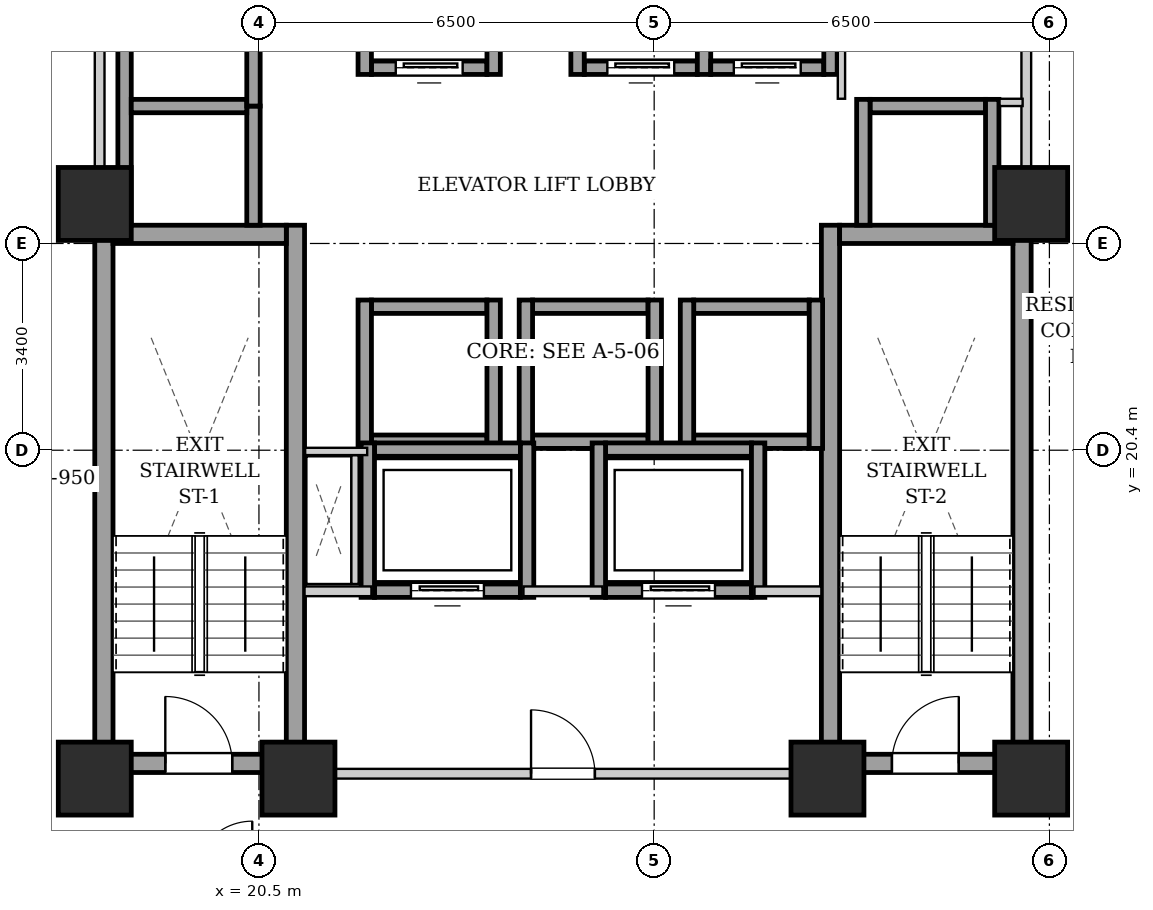
"""IFC4 building model, lengths in metres.
Left out: names, types, materials, properties, quantities, classifications, styles, units other than length and angle.
Written with IfcOpenShell. Run it as: python <this file> out.ifc"""

import sys

from ifc_helpers import new_model, si_unit, direction, frame, frame_2d, origin, origin_2d, place, context, subcontext, project, spatial, rectangle, extrude, element, fill, save


model = new_model("IFC4")
c1 = context("Model", 3, precision=1e-05, world=origin(), true_north=direction((0.0, 1.0)))
c2 = subcontext(c1, "Body", "Model", "MODEL_VIEW")
j1 = project(units=[si_unit("LENGTHUNIT", "METRE"), si_unit("PLANEANGLEUNIT", "RADIAN")], contexts=[c1])
p1 = place(None, origin())
s1 = spatial("IfcSite", under=j1, at=p1, CompositionType="ELEMENT")
p2 = place(p1, origin())
s2 = spatial("IfcBuilding", under=s1, at=p2, CompositionType="ELEMENT")
p3 = place(p2, frame((0.0, 0.0, 48.2)))
s3 = spatial("IfcBuildingStorey", under=s2, at=p3, CompositionType="ELEMENT", Elevation=48.2)
for number, where, z_axis, x_axis in (
    (1, (17.8, 15.0, 0.0), (0.0, 0.0, 1.0), (1.0, 0.0, 0.0)),
    (2, (21.15, 15.0, 0.0), (0.0, 0.0, 1.0), (1.0, 0.0, 0.0)),
    (3, (29.85, 15.0, 0.0), (0.0, 0.0, 1.0), (1.0, 0.0, 0.0)),
    (4, (33.2, 15.0, 0.0), (0.0, 0.0, 1.0), (1.0, 0.0, 0.0)),
    (5, (17.8, 24.45, 0.0), (0.0, 0.0, 1.0), (1.0, 0.0, 0.0)),
    (6, (33.2, 24.45, 0.0), (0.0, 0.0, 1.0), (1.0, 0.0, 0.0)),
):
    element("IfcColumn", number, at=place(p3, frame(where, z_axis=z_axis, x_axis=x_axis)), inside=s3, PredefinedType="COLUMN", context=c2, shape_type="SweptSolid", body=[
        extrude(rectangle(XDim=1.2, YDim=1.2, at=origin_2d()), origin(), (0.0, 0.0, 1.0), 3.2),
    ])
for number, where, z_axis, x_axis in (
    (7, (17.95, 15.1, 0.0), (0.0, 0.0, 1.0), (0.0, 1.0, 0.0)),
    (8, (21.1, 15.1, 0.0), (0.0, 0.0, 1.0), (0.0, 1.0, 0.0)),
):
    element("IfcWall", number, at=place(p3, frame(where, z_axis=z_axis, x_axis=x_axis)), inside=s3, PredefinedType="SHEAR", context=c2, shape_type="SweptSolid", body=[
        extrude(rectangle(XDim=9.0, YDim=0.3, at=frame_2d((4.5, 0.0))), origin(), (0.0, 0.0, 1.0), 2.94),
    ])
p4 = place(p3, frame((18.1, 23.95, 0.0), z_axis=(0.0, 0.0, 1.0), x_axis=(1.0, 0.0, 0.0)))
e9 = element("IfcWall", 9, at=p4, inside=s3, PredefinedType="SHEAR", context=c2, shape_type="SweptSolid", body=[
    extrude(rectangle(XDim=2.85, YDim=0.3, at=frame_2d((1.425, 0.0))), origin(), (0.0, 0.0, 1.0), 2.94),
])
p5 = place(p3, frame((18.1, 15.25, 0.0), z_axis=(0.0, 0.0, 1.0), x_axis=(1.0, 0.0, 0.0)))
e10 = element("IfcWall", 10, at=p5, inside=s3, PredefinedType="SHEAR", context=c2, shape_type="SweptSolid", body=[
    extrude(rectangle(XDim=2.85, YDim=0.3, at=frame_2d((1.425, 0.0))), origin(), (0.0, 0.0, 1.0), 2.94),
])
p6 = place(p5, frame((0.86, 0.0, 0.0)))
e11 = element("IfcOpeningElement", 11, at=p6, cuts=e10, PredefinedType="OPENING", context=c2, shape_type="SweptSolid", body=[
    extrude(rectangle(XDim=1.1, YDim=2.05, at=frame_2d((0.55, 1.025))), frame((0.0, 0.16, 0.0), z_axis=(0.0, -1.0, 0.0), x_axis=(1.0, 0.0, 0.0)), (0.0, 0.0, 1.0), 0.32),
])
for number, where, z_axis, x_axis in (
    (12, (29.9, 15.1, 0.0), (0.0, 0.0, 1.0), (0.0, 1.0, 0.0)),
    (13, (33.05, 15.1, 0.0), (0.0, 0.0, 1.0), (0.0, 1.0, 0.0)),
):
    element("IfcWall", number, at=place(p3, frame(where, z_axis=z_axis, x_axis=x_axis)), inside=s3, PredefinedType="SHEAR", context=c2, shape_type="SweptSolid", body=[
        extrude(rectangle(XDim=9.0, YDim=0.3, at=frame_2d((4.5, 0.0))), origin(), (0.0, 0.0, 1.0), 2.94),
    ])
p7 = place(p3, frame((30.05, 23.95, 0.0), z_axis=(0.0, 0.0, 1.0), x_axis=(1.0, 0.0, 0.0)))
e14 = element("IfcWall", 14, at=p7, inside=s3, PredefinedType="SHEAR", context=c2, shape_type="SweptSolid", body=[
    extrude(rectangle(XDim=2.85, YDim=0.3, at=frame_2d((1.425, 0.0))), origin(), (0.0, 0.0, 1.0), 2.94),
])
p8 = place(p3, frame((30.05, 15.25, 0.0), z_axis=(0.0, 0.0, 1.0), x_axis=(1.0, 0.0, 0.0)))
e15 = element("IfcWall", 15, at=p8, inside=s3, PredefinedType="SHEAR", context=c2, shape_type="SweptSolid", body=[
    extrude(rectangle(XDim=2.85, YDim=0.3, at=frame_2d((1.425, 0.0))), origin(), (0.0, 0.0, 1.0), 2.94),
])
p9 = place(p8, frame((0.86, 0.0, 0.0)))
e16 = element("IfcOpeningElement", 16, at=p9, cuts=e15, PredefinedType="OPENING", context=c2, shape_type="SweptSolid", body=[
    extrude(rectangle(XDim=1.1, YDim=2.05, at=frame_2d((0.55, 1.025))), frame((0.0, 0.16, 0.0), z_axis=(0.0, -1.0, 0.0), x_axis=(1.0, 0.0, 0.0)), (0.0, 0.0, 1.0), 0.32),
])
p10 = place(p3, frame((22.35, 26.69, 0.0), z_axis=(0.0, 0.0, 1.0), x_axis=(1.0, 0.0, 0.0)))
e17 = element("IfcWall", 17, at=p10, inside=s3, PredefinedType="SHEAR", context=c2, shape_type="SweptSolid", body=[
    extrude(rectangle(XDim=1.9, YDim=0.22, at=frame_2d((0.95, 0.0))), origin(), (0.0, 0.0, 1.0), 2.94),
])
p11 = place(p10, frame((0.4, 0.0, 0.0)))
e18 = element("IfcOpeningElement", 18, at=p11, cuts=e17, PredefinedType="OPENING", context=c2, shape_type="SweptSolid", body=[
    extrude(rectangle(XDim=1.1, YDim=2.15, at=frame_2d((0.55, 1.075))), frame((0.0, 0.12, 0.0), z_axis=(0.0, -1.0, 0.0), x_axis=(1.0, 0.0, 0.0)), (0.0, 0.0, 1.0), 0.24),
])
for number, where, z_axis, x_axis in (
    (19, (22.24, 26.58, 0.0), (0.0, 0.0, 1.0), (0.0, 1.0, 0.0)),
    (20, (24.36, 26.58, 0.0), (0.0, 0.0, 1.0), (0.0, 1.0, 0.0)),
):
    element("IfcWall", number, at=place(p3, frame(where, z_axis=z_axis, x_axis=x_axis)), inside=s3, PredefinedType="SHEAR", context=c2, shape_type="SweptSolid", body=[
        extrude(rectangle(XDim=2.44, YDim=0.22, at=frame_2d((1.22, 0.0))), origin(), (0.0, 0.0, 1.0), 2.94),
    ])
p12 = place(p3, frame((25.85, 26.69, 0.0), z_axis=(0.0, 0.0, 1.0), x_axis=(1.0, 0.0, 0.0)))
e21 = element("IfcWall", 21, at=p12, inside=s3, PredefinedType="SHEAR", context=c2, shape_type="SweptSolid", body=[
    extrude(rectangle(XDim=1.86, YDim=0.22, at=frame_2d((0.93, 0.0))), origin(), (0.0, 0.0, 1.0), 2.94),
])
p13 = place(p12, frame((0.38, 0.0, 0.0)))
e22 = element("IfcOpeningElement", 22, at=p13, cuts=e21, PredefinedType="OPENING", context=c2, shape_type="SweptSolid", body=[
    extrude(rectangle(XDim=1.1, YDim=2.15, at=frame_2d((0.55, 1.075))), frame((0.0, 0.12, 0.0), z_axis=(0.0, -1.0, 0.0), x_axis=(1.0, 0.0, 0.0)), (0.0, 0.0, 1.0), 0.24),
])
for number, where, z_axis, x_axis in (
    (23, (25.74, 26.58, 0.0), (0.0, 0.0, 1.0), (0.0, 1.0, 0.0)),
    (24, (27.82, 26.58, 0.0), (0.0, 0.0, 1.0), (0.0, 1.0, 0.0)),
):
    element("IfcWall", number, at=place(p3, frame(where, z_axis=z_axis, x_axis=x_axis)), inside=s3, PredefinedType="SHEAR", context=c2, shape_type="SweptSolid", body=[
        extrude(rectangle(XDim=2.44, YDim=0.22, at=frame_2d((1.22, 0.0))), origin(), (0.0, 0.0, 1.0), 2.94),
    ])
p14 = place(p3, frame((27.93, 26.69, 0.0), z_axis=(0.0, 0.0, 1.0), x_axis=(1.0, 0.0, 0.0)))
e25 = element("IfcWall", 25, at=p14, inside=s3, PredefinedType="SHEAR", context=c2, shape_type="SweptSolid", body=[
    extrude(rectangle(XDim=1.86, YDim=0.22, at=frame_2d((0.93, 0.0))), origin(), (0.0, 0.0, 1.0), 2.94),
])
p15 = place(p14, frame((0.38, 0.0, 0.0)))
e26 = element("IfcOpeningElement", 26, at=p15, cuts=e25, PredefinedType="OPENING", context=c2, shape_type="SweptSolid", body=[
    extrude(rectangle(XDim=1.1, YDim=2.15, at=frame_2d((0.55, 1.075))), frame((0.0, 0.12, 0.0), z_axis=(0.0, -1.0, 0.0), x_axis=(1.0, 0.0, 0.0)), (0.0, 0.0, 1.0), 0.24),
])
p16 = place(p3, frame((29.9, 26.58, 0.0), z_axis=(0.0, 0.0, 1.0), x_axis=(0.0, 1.0, 0.0)))
e27 = element("IfcWall", 27, at=p16, inside=s3, PredefinedType="SHEAR", context=c2, shape_type="SweptSolid", body=[
    extrude(rectangle(XDim=2.44, YDim=0.22, at=frame_2d((1.22, 0.0))), origin(), (0.0, 0.0, 1.0), 2.94),
])
for number, where, z_axis, x_axis in (
    (28, (22.35, 20.54, 0.0), (0.0, 0.0, 1.0), (1.0, 0.0, 0.0)),
    (29, (22.35, 22.76, 0.0), (0.0, 0.0, 1.0), (1.0, 0.0, 0.0)),
):
    element("IfcWall", number, at=place(p3, frame(where, z_axis=z_axis, x_axis=x_axis)), inside=s3, PredefinedType="SHEAR", context=c2, shape_type="SweptSolid", body=[
        extrude(rectangle(XDim=1.9, YDim=0.22, at=frame_2d((0.95, 0.0))), origin(), (0.0, 0.0, 1.0), 2.94),
    ])
for number, where, z_axis, x_axis in (
    (30, (22.24, 20.43, 0.0), (0.0, 0.0, 1.0), (0.0, 1.0, 0.0)),
    (31, (24.36, 20.43, 0.0), (0.0, 0.0, 1.0), (0.0, 1.0, 0.0)),
):
    element("IfcWall", number, at=place(p3, frame(where, z_axis=z_axis, x_axis=x_axis)), inside=s3, PredefinedType="SHEAR", context=c2, shape_type="SweptSolid", body=[
        extrude(rectangle(XDim=2.44, YDim=0.22, at=frame_2d((1.22, 0.0))), origin(), (0.0, 0.0, 1.0), 2.94),
    ])
for number, where, z_axis, x_axis in (
    (32, (25.0, 20.54, 0.0), (0.0, 0.0, 1.0), (1.0, 0.0, 0.0)),
    (33, (25.0, 22.76, 0.0), (0.0, 0.0, 1.0), (1.0, 0.0, 0.0)),
):
    element("IfcWall", number, at=place(p3, frame(where, z_axis=z_axis, x_axis=x_axis)), inside=s3, PredefinedType="SHEAR", context=c2, shape_type="SweptSolid", body=[
        extrude(rectangle(XDim=1.9, YDim=0.22, at=frame_2d((0.95, 0.0))), origin(), (0.0, 0.0, 1.0), 2.94),
    ])
for number, where, z_axis, x_axis in (
    (34, (24.89, 20.43, 0.0), (0.0, 0.0, 1.0), (0.0, 1.0, 0.0)),
    (35, (27.01, 20.43, 0.0), (0.0, 0.0, 1.0), (0.0, 1.0, 0.0)),
):
    element("IfcWall", number, at=place(p3, frame(where, z_axis=z_axis, x_axis=x_axis)), inside=s3, PredefinedType="SHEAR", context=c2, shape_type="SweptSolid", body=[
        extrude(rectangle(XDim=2.44, YDim=0.22, at=frame_2d((1.22, 0.0))), origin(), (0.0, 0.0, 1.0), 2.94),
    ])
for number, where, z_axis, x_axis in (
    (36, (27.65, 20.54, 0.0), (0.0, 0.0, 1.0), (1.0, 0.0, 0.0)),
    (37, (27.65, 22.76, 0.0), (0.0, 0.0, 1.0), (1.0, 0.0, 0.0)),
):
    element("IfcWall", number, at=place(p3, frame(where, z_axis=z_axis, x_axis=x_axis)), inside=s3, PredefinedType="SHEAR", context=c2, shape_type="SweptSolid", body=[
        extrude(rectangle(XDim=1.9, YDim=0.22, at=frame_2d((0.95, 0.0))), origin(), (0.0, 0.0, 1.0), 2.94),
    ])
for number, where, z_axis, x_axis in (
    (38, (27.54, 20.43, 0.0), (0.0, 0.0, 1.0), (0.0, 1.0, 0.0)),
    (39, (29.66, 20.43, 0.0), (0.0, 0.0, 1.0), (0.0, 1.0, 0.0)),
):
    element("IfcWall", number, at=place(p3, frame(where, z_axis=z_axis, x_axis=x_axis)), inside=s3, PredefinedType="SHEAR", context=c2, shape_type="SweptSolid", body=[
        extrude(rectangle(XDim=2.44, YDim=0.22, at=frame_2d((1.22, 0.0))), origin(), (0.0, 0.0, 1.0), 2.94),
    ])
p17 = place(p3, frame((18.29, 24.1, 0.0), z_axis=(0.0, 0.0, 1.0), x_axis=(0.0, 1.0, 0.0)))
e40 = element("IfcWall", 40, at=p17, inside=s3, PredefinedType="SHEAR", context=c2, shape_type="SweptSolid", body=[
    extrude(rectangle(XDim=4.14, YDim=0.22, at=frame_2d((2.07, 0.0))), origin(), (0.0, 0.0, 1.0), 2.94),
])
p18 = place(p3, frame((20.41, 24.1, 0.0), z_axis=(0.0, 0.0, 1.0), x_axis=(0.0, 1.0, 0.0)))
e41 = element("IfcWall", 41, at=p18, inside=s3, PredefinedType="SHEAR", context=c2, shape_type="SweptSolid", body=[
    extrude(rectangle(XDim=1.96, YDim=0.22, at=frame_2d((0.98, 0.0))), origin(), (0.0, 0.0, 1.0), 2.94),
])
p19 = place(p3, frame((18.4, 26.06, 0.0), z_axis=(0.0, 0.0, 1.0), x_axis=(1.0, 0.0, 0.0)))
e42 = element("IfcWall", 42, at=p19, inside=s3, PredefinedType="SHEAR", context=c2, shape_type="SweptSolid", body=[
    extrude(rectangle(XDim=1.9, YDim=0.22, at=frame_2d((0.95, 0.0))), origin(), (0.0, 0.0, 1.0), 2.94),
])
p20 = place(p3, frame((20.41, 26.06, 0.0), z_axis=(0.0, 0.0, 1.0), x_axis=(0.0, 1.0, 0.0)))
e43 = element("IfcWall", 43, at=p20, inside=s3, PredefinedType="SHEAR", context=c2, shape_type="SweptSolid", body=[
    extrude(rectangle(XDim=2.18, YDim=0.22, at=frame_2d((1.09, 0.0))), origin(), (0.0, 0.0, 1.0), 2.94),
])
p21 = place(p3, frame((30.55, 26.06, 0.0), z_axis=(0.0, 0.0, 1.0), x_axis=(1.0, 0.0, 0.0)))
e44 = element("IfcWall", 44, at=p21, inside=s3, PredefinedType="SHEAR", context=c2, shape_type="SweptSolid", body=[
    extrude(rectangle(XDim=1.9, YDim=0.22, at=frame_2d((0.95, 0.0))), origin(), (0.0, 0.0, 1.0), 2.94),
])
for number, where, z_axis, x_axis in (
    (45, (30.44, 24.1, 0.0), (0.0, 0.0, 1.0), (0.0, 1.0, 0.0)),
    (46, (32.56, 24.1, 0.0), (0.0, 0.0, 1.0), (0.0, 1.0, 0.0)),
):
    element("IfcWall", number, at=place(p3, frame(where, z_axis=z_axis, x_axis=x_axis)), inside=s3, PredefinedType="SHEAR", context=c2, shape_type="SweptSolid", body=[
        extrude(rectangle(XDim=2.07, YDim=0.22, at=frame_2d((1.035, 0.0))), origin(), (0.0, 0.0, 1.0), 2.94),
    ])
p22 = place(p3, frame((22.4, 18.09, 0.0), z_axis=(0.0, 0.0, 1.0), x_axis=(1.0, 0.0, 0.0)))
e47 = element("IfcWall", 47, at=p22, inside=s3, PredefinedType="SHEAR", context=c2, shape_type="SweptSolid", body=[
    extrude(rectangle(XDim=2.4, YDim=0.22, at=frame_2d((1.2, 0.0))), origin(), (0.0, 0.0, 1.0), 2.94),
])
p23 = place(p22, frame((0.6, 0.0, 0.0)))
e48 = element("IfcOpeningElement", 48, at=p23, cuts=e47, PredefinedType="OPENING", context=c2, shape_type="SweptSolid", body=[
    extrude(rectangle(XDim=1.2, YDim=2.15, at=frame_2d((0.6, 1.075))), frame((0.0, 0.12, 0.0), z_axis=(0.0, -1.0, 0.0), x_axis=(1.0, 0.0, 0.0)), (0.0, 0.0, 1.0), 0.24),
])
p24 = place(p3, frame((22.4, 20.41, 0.0), z_axis=(0.0, 0.0, 1.0), x_axis=(1.0, 0.0, 0.0)))
e49 = element("IfcWall", 49, at=p24, inside=s3, PredefinedType="SHEAR", context=c2, shape_type="SweptSolid", body=[
    extrude(rectangle(XDim=2.4, YDim=0.22, at=frame_2d((1.2, 0.0))), origin(), (0.0, 0.0, 1.0), 2.94),
])
for number, where, z_axis, x_axis in (
    (50, (22.29, 17.98, 0.0), (0.0, 0.0, 1.0), (0.0, 1.0, 0.0)),
    (51, (24.91, 17.98, 0.0), (0.0, 0.0, 1.0), (0.0, 1.0, 0.0)),
):
    element("IfcWall", number, at=place(p3, frame(where, z_axis=z_axis, x_axis=x_axis)), inside=s3, PredefinedType="SHEAR", context=c2, shape_type="SweptSolid", body=[
        extrude(rectangle(XDim=2.54, YDim=0.22, at=frame_2d((1.27, 0.0))), origin(), (0.0, 0.0, 1.0), 2.94),
    ])
p25 = place(p3, frame((26.2, 18.09, 0.0), z_axis=(0.0, 0.0, 1.0), x_axis=(1.0, 0.0, 0.0)))
e52 = element("IfcWall", 52, at=p25, inside=s3, PredefinedType="SHEAR", context=c2, shape_type="SweptSolid", body=[
    extrude(rectangle(XDim=2.4, YDim=0.22, at=frame_2d((1.2, 0.0))), origin(), (0.0, 0.0, 1.0), 2.94),
])
p26 = place(p25, frame((0.6, 0.0, 0.0)))
e53 = element("IfcOpeningElement", 53, at=p26, cuts=e52, PredefinedType="OPENING", context=c2, shape_type="SweptSolid", body=[
    extrude(rectangle(XDim=1.2, YDim=2.15, at=frame_2d((0.6, 1.075))), frame((0.0, 0.12, 0.0), z_axis=(0.0, -1.0, 0.0), x_axis=(1.0, 0.0, 0.0)), (0.0, 0.0, 1.0), 0.24),
])
p27 = place(p3, frame((26.2, 20.41, 0.0), z_axis=(0.0, 0.0, 1.0), x_axis=(1.0, 0.0, 0.0)))
e54 = element("IfcWall", 54, at=p27, inside=s3, PredefinedType="SHEAR", context=c2, shape_type="SweptSolid", body=[
    extrude(rectangle(XDim=2.4, YDim=0.22, at=frame_2d((1.2, 0.0))), origin(), (0.0, 0.0, 1.0), 2.94),
])
for number, where, z_axis, x_axis in (
    (55, (26.09, 17.98, 0.0), (0.0, 0.0, 1.0), (0.0, 1.0, 0.0)),
    (56, (28.71, 17.98, 0.0), (0.0, 0.0, 1.0), (0.0, 1.0, 0.0)),
):
    element("IfcWall", number, at=place(p3, frame(where, z_axis=z_axis, x_axis=x_axis)), inside=s3, PredefinedType="SHEAR", context=c2, shape_type="SweptSolid", body=[
        extrude(rectangle(XDim=2.54, YDim=0.22, at=frame_2d((1.27, 0.0))), origin(), (0.0, 0.0, 1.0), 2.94),
    ])
p28 = place(p3, frame((21.25, 15.08, 0.0), z_axis=(0.0, 0.0, 1.0), x_axis=(1.0, 0.0, 0.0)))
e57 = element("IfcWall", 57, at=p28, inside=s3, PredefinedType="PARTITIONING", context=c2, shape_type="SweptSolid", body=[
    extrude(rectangle(XDim=8.5, YDim=0.16, at=frame_2d((4.25, 0.0))), origin(), (0.0, 0.0, 1.0), 2.232),
])
p29 = place(p28, frame((3.725, 0.0, 0.0)))
e58 = element("IfcOpeningElement", 58, at=p29, cuts=e57, PredefinedType="OPENING", context=c2, shape_type="SweptSolid", body=[
    extrude(rectangle(XDim=1.05, YDim=2.05, at=frame_2d((0.525, 1.025))), frame((0.0, 0.09, 0.0), z_axis=(0.0, -1.0, 0.0), x_axis=(1.0, 0.0, 0.0)), (0.0, 0.0, 1.0), 0.18),
])
p30 = place(p3, frame((21.25, 18.08, 0.0), z_axis=(0.0, 0.0, 1.0), x_axis=(1.0, 0.0, 0.0)))
e59 = element("IfcWall", 59, at=p30, inside=s3, PredefinedType="PARTITIONING", context=c2, shape_type="SweptSolid", body=[
    extrude(rectangle(XDim=1.1, YDim=0.16, at=frame_2d((0.55, 0.0))), origin(), (0.0, 0.0, 1.0), 2.94),
])
p31 = place(p3, frame((24.85, 18.08, 0.0), z_axis=(0.0, 0.0, 1.0), x_axis=(1.0, 0.0, 0.0)))
e60 = element("IfcWall", 60, at=p31, inside=s3, PredefinedType="PARTITIONING", context=c2, shape_type="SweptSolid", body=[
    extrude(rectangle(XDim=1.3, YDim=0.16, at=frame_2d((0.65, 0.0))), origin(), (0.0, 0.0, 1.0), 2.94),
])
p32 = place(p3, frame((28.65, 18.08, 0.0), z_axis=(0.0, 0.0, 1.0), x_axis=(1.0, 0.0, 0.0)))
e61 = element("IfcWall", 61, at=p32, inside=s3, PredefinedType="PARTITIONING", context=c2, shape_type="SweptSolid", body=[
    extrude(rectangle(XDim=1.1, YDim=0.16, at=frame_2d((0.55, 0.0))), origin(), (0.0, 0.0, 1.0), 2.94),
])
for number, where, z_axis, x_axis in (
    (62, (17.88, 24.12, 0.0), (0.0, 0.0, 1.0), (0.0, 1.0, 0.0)),
    (63, (33.12, 24.12, 0.0), (0.0, 0.0, 1.0), (0.0, 1.0, 0.0)),
):
    element("IfcWall", number, at=place(p3, frame(where, z_axis=z_axis, x_axis=x_axis)), inside=s3, PredefinedType="PARTITIONING", context=c2, shape_type="SweptSolid", body=[
        extrude(rectangle(XDim=4.76, YDim=0.16, at=frame_2d((2.38, 0.0))), origin(), (0.0, 0.0, 1.0), 2.275),
    ])
p33 = place(p3, frame((22.08, 18.2, 0.0), z_axis=(0.0, 0.0, 1.0), x_axis=(0.0, 1.0, 0.0)))
e64 = element("IfcWall", 64, at=p33, inside=s3, PredefinedType="PARTITIONING", context=c2, shape_type="SweptSolid", body=[
    extrude(rectangle(XDim=2.12, YDim=0.12, at=frame_2d((1.06, 0.0))), origin(), (0.0, 0.0, 1.0), 2.94),
])
p34 = place(p3, frame((22.28, 20.38, 0.0), z_axis=(0.0, 0.0, 1.0), x_axis=(-1.0, 0.0, 0.0)))
e65 = element("IfcWall", 65, at=p34, inside=s3, PredefinedType="PARTITIONING", context=c2, shape_type="SweptSolid", body=[
    extrude(rectangle(XDim=1.02, YDim=0.12, at=frame_2d((0.51, 0.0))), origin(), (0.0, 0.0, 1.0), 2.94),
])
p35 = place(p3, frame((30.08, 26.18, 0.0), z_axis=(0.0, 0.0, 1.0), x_axis=(0.0, 1.0, 0.0)))
e66 = element("IfcWall", 66, at=p35, inside=s3, PredefinedType="PARTITIONING", context=c2, shape_type="SweptSolid", body=[
    extrude(rectangle(XDim=2.68, YDim=0.12, at=frame_2d((1.34, 0.0))), origin(), (0.0, 0.0, 1.0), 2.94),
])
p36 = place(p3, frame((32.68, 26.12, 0.0), z_axis=(0.0, 0.0, 1.0), x_axis=(1.0, 0.0, 0.0)))
e67 = element("IfcWall", 67, at=p36, inside=s3, PredefinedType="PARTITIONING", context=c2, shape_type="SweptSolid", body=[
    extrude(rectangle(XDim=0.38, YDim=0.12, at=frame_2d((0.19, 0.0))), origin(), (0.0, 0.0, 1.0), 2.94),
])
p37 = place(p6, origin())
e68 = element("IfcDoor", 68, at=p37, inside=s3, OperationType="SINGLE_SWING_LEFT", PredefinedType="DOOR", context=c2, shape_type="SweptSolid", body=[
    extrude(rectangle(XDim=1.1, YDim=2.05, at=frame_2d((0.55, 1.025))), frame((0.0, 0.025, 0.0), z_axis=(0.0, -1.0, 0.0), x_axis=(1.0, 0.0, 0.0)), (0.0, 0.0, 1.0), 0.05),
])
fill(e11, e68)
p38 = place(p9, origin())
e69 = element("IfcDoor", 69, at=p38, inside=s3, OperationType="SINGLE_SWING_RIGHT", PredefinedType="DOOR", context=c2, shape_type="SweptSolid", body=[
    extrude(rectangle(XDim=1.1, YDim=2.05, at=frame_2d((0.55, 1.025))), frame((0.0, 0.025, 0.0), z_axis=(0.0, -1.0, 0.0), x_axis=(1.0, 0.0, 0.0)), (0.0, 0.0, 1.0), 0.05),
])
fill(e16, e69)
p39 = place(p11, origin())
e70 = element("IfcDoor", 70, at=p39, inside=s3, OperationType="SLIDING_TO_LEFT", PredefinedType="DOOR", context=c2, shape_type="SweptSolid", body=[
    extrude(rectangle(XDim=1.1, YDim=2.15, at=frame_2d((0.55, 1.075))), frame((0.0, 0.025, 0.0), z_axis=(0.0, -1.0, 0.0), x_axis=(1.0, 0.0, 0.0)), (0.0, 0.0, 1.0), 0.05),
])
fill(e18, e70)
p40 = place(p13, origin())
e71 = element("IfcDoor", 71, at=p40, inside=s3, OperationType="SLIDING_TO_LEFT", PredefinedType="DOOR", context=c2, shape_type="SweptSolid", body=[
    extrude(rectangle(XDim=1.1, YDim=2.15, at=frame_2d((0.55, 1.075))), frame((0.0, 0.025, 0.0), z_axis=(0.0, -1.0, 0.0), x_axis=(1.0, 0.0, 0.0)), (0.0, 0.0, 1.0), 0.05),
])
fill(e22, e71)
p41 = place(p15, origin())
e72 = element("IfcDoor", 72, at=p41, inside=s3, OperationType="SLIDING_TO_LEFT", PredefinedType="DOOR", context=c2, shape_type="SweptSolid", body=[
    extrude(rectangle(XDim=1.1, YDim=2.15, at=frame_2d((0.55, 1.075))), frame((0.0, 0.025, 0.0), z_axis=(0.0, -1.0, 0.0), x_axis=(1.0, 0.0, 0.0)), (0.0, 0.0, 1.0), 0.05),
])
fill(e26, e72)
p42 = place(p23, origin())
e73 = element("IfcDoor", 73, at=p42, inside=s3, OperationType="SLIDING_TO_LEFT", PredefinedType="DOOR", context=c2, shape_type="SweptSolid", body=[
    extrude(rectangle(XDim=1.2, YDim=2.15, at=frame_2d((0.6, 1.075))), frame((0.0, 0.025, 0.0), z_axis=(0.0, -1.0, 0.0), x_axis=(1.0, 0.0, 0.0)), (0.0, 0.0, 1.0), 0.05),
])
fill(e48, e73)
p43 = place(p26, origin())
e74 = element("IfcDoor", 74, at=p43, inside=s3, OperationType="SLIDING_TO_LEFT", PredefinedType="DOOR", context=c2, shape_type="SweptSolid", body=[
    extrude(rectangle(XDim=1.2, YDim=2.15, at=frame_2d((0.6, 1.075))), frame((0.0, 0.025, 0.0), z_axis=(0.0, -1.0, 0.0), x_axis=(1.0, 0.0, 0.0)), (0.0, 0.0, 1.0), 0.05),
])
fill(e53, e74)
p44 = place(p29, origin())
e75 = element("IfcDoor", 75, at=p44, inside=s3, OperationType="SINGLE_SWING_LEFT", PredefinedType="DOOR", context=c2, shape_type="SweptSolid", body=[
    extrude(rectangle(XDim=1.05, YDim=2.05, at=frame_2d((0.525, 1.025))), frame((0.0, 0.025, 0.0), z_axis=(0.0, -1.0, 0.0), x_axis=(1.0, 0.0, 0.0)), (0.0, 0.0, 1.0), 0.05),
])
fill(e58, e75)
save(model, sys.argv[1])
